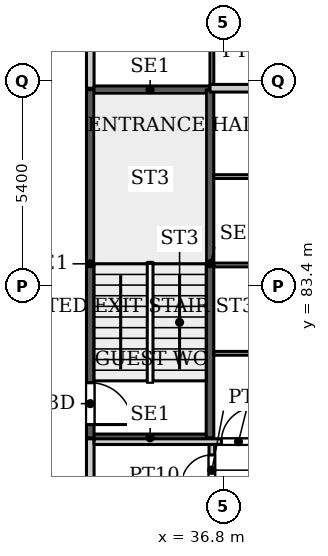
"""IFC4 building model, lengths in metres.
Left out: names, types, materials, properties, quantities, classifications, styles, units other than length and angle.
Written with IfcOpenShell. Run it as: python <this file> out.ifc"""

import sys

from ifc_helpers import new_model, si_unit, direction, frame, frame_2d, origin, place, context, subcontext, project, spatial, rectangle, extrude, source, transform, mapped, element, fill, save


model = new_model("IFC4")
c1 = context("Model", 3, precision=1e-05, world=origin(), true_north=direction((0.0, 1.0)))
c2 = subcontext(c1, "Body", "Model", "MODEL_VIEW")
j1 = project(units=[si_unit("LENGTHUNIT", "METRE"), si_unit("PLANEANGLEUNIT", "RADIAN")], contexts=[c1])
p1 = place(None, origin())
s1 = spatial("IfcSite", under=j1, at=p1, CompositionType="ELEMENT")
p2 = place(p1, origin())
s2 = spatial("IfcBuilding", under=s1, at=p2, CompositionType="ELEMENT")
p3 = place(p2, frame((0.0, 0.0, 53.9)))
s3 = spatial("IfcBuildingStorey", under=s2, at=p3, CompositionType="ELEMENT", Elevation=53.9)
for number, where, z_axis, x_axis in (
    (1, (33.3, 79.4, 0.0), (0.0, 0.0, 1.0), (1.0, 0.0, 0.0)),
    (2, (33.3, 88.56, 0.0), (0.0, 0.0, 1.0), (1.0, 0.0, 0.0)),
):
    element("IfcWall", number, at=place(p3, frame(where, z_axis=z_axis, x_axis=x_axis)), inside=s3, PredefinedType="SHEAR", context=c2, shape_type="SweptSolid", body=[
        extrude(rectangle(XDim=3.15, YDim=0.2, at=frame_2d((1.575, 0.0))), origin(), (0.0, 0.0, 1.0), 3.9),
    ])
p4 = place(p3, frame((33.3, 79.4, 0.0), z_axis=(0.0, 0.0, 1.0), x_axis=(0.0, 1.0, 0.0)))
e3 = element("IfcWall", 3, at=p4, inside=s3, PredefinedType="SHEAR", context=c2, shape_type="SweptSolid", body=[
    extrude(rectangle(XDim=9.16, YDim=0.2, at=frame_2d((4.58, 0.0))), origin(), (0.0, 0.0, 1.0), 3.9),
])
p5 = place(p4, frame((0.35, 0.0, 0.0)))
e4 = element("IfcOpeningElement", 4, at=p5, cuts=e3, PredefinedType="OPENING", context=c2, shape_type="SweptSolid", body=[
    extrude(rectangle(XDim=1.1, YDim=2.2, at=frame_2d((0.55, 1.1))), frame((0.0, 0.11, 0.0), z_axis=(0.0, -1.0, 0.0), x_axis=(1.0, 0.0, 0.0)), (0.0, 0.0, 1.0), 0.22),
])
p6 = place(p3, frame((36.45, 79.4, 0.0), z_axis=(0.0, 0.0, 1.0), x_axis=(0.0, 1.0, 0.0)))
e5 = element("IfcWall", 5, at=p6, inside=s3, PredefinedType="SHEAR", context=c2, shape_type="SweptSolid", body=[
    extrude(rectangle(XDim=9.16, YDim=0.2, at=frame_2d((4.58, 0.0))), origin(), (0.0, 0.0, 1.0), 3.9),
])
p7 = place(p3, frame((33.3, 54.4, 0.0), z_axis=(0.0, 0.0, 1.0), x_axis=(0.0, 1.0, 0.0)))
e6 = element("IfcWall", 6, at=p7, inside=s3, PredefinedType="PARTITIONING", context=c2, shape_type="SweptSolid", body=[
    extrude(rectangle(XDim=24.975, YDim=0.2, at=frame_2d((12.488, 0.0))), origin(), (0.0, 0.0, 1.0), 3.6),
])
p8 = place(p7, frame((10.6, 0.0, 0.0)))
e7 = element("IfcOpeningElement", 7, at=p8, cuts=e6, PredefinedType="OPENING", context=c2, shape_type="SweptSolid", body=[
    extrude(rectangle(XDim=1.0, YDim=2.1, at=frame_2d((0.5, 1.05))), frame((0.0, 0.11, 0.0), z_axis=(0.0, -1.0, 0.0), x_axis=(1.0, 0.0, 0.0)), (0.0, 0.0, 1.0), 0.22),
])
p9 = place(p7, frame((22.0, 0.0, 0.0)))
e8 = element("IfcOpeningElement", 8, at=p9, cuts=e6, PredefinedType="OPENING", context=c2, shape_type="SweptSolid", body=[
    extrude(rectangle(XDim=1.0, YDim=2.1, at=frame_2d((0.5, 1.05))), frame((0.0, 0.11, 0.0), z_axis=(0.0, -1.0, 0.0), x_axis=(1.0, 0.0, 0.0)), (0.0, 0.0, 1.0), 0.22),
])
p10 = place(p3, frame((33.3, 88.6, 0.0), z_axis=(0.0, 0.0, 1.0), x_axis=(0.0, 1.0, 0.0)))
e9 = element("IfcWall", 9, at=p10, inside=s3, PredefinedType="PARTITIONING", context=c2, shape_type="SweptSolid", body=[
    extrude(rectangle(XDim=5.175, YDim=0.2, at=frame_2d((2.587, 0.0))), origin(), (0.0, 0.0, 1.0), 3.6),
])
p11 = place(p10, frame((3.7, 0.0, 0.0)))
e10 = element("IfcOpeningElement", 10, at=p11, cuts=e9, PredefinedType="OPENING", context=c2, shape_type="SweptSolid", body=[
    extrude(rectangle(XDim=1.0, YDim=2.1, at=frame_2d((0.5, 1.05))), frame((0.0, 0.11, 0.0), z_axis=(0.0, -1.0, 0.0), x_axis=(1.0, 0.0, 0.0)), (0.0, 0.0, 1.0), 0.22),
])
p12 = place(p3, frame((33.4, 79.3, 0.0), z_axis=(0.0, 0.0, 1.0), x_axis=(1.0, 0.0, 0.0)))
e11 = element("IfcWall", 11, at=p12, inside=s3, PredefinedType="PARTITIONING", context=c2, shape_type="SweptSolid", body=[
    extrude(rectangle(XDim=12.5, YDim=0.15, at=frame_2d((6.25, 0.0))), origin(), (0.0, 0.0, 1.0), 3.6),
])
p13 = place(p12, frame((3.35, 0.0, 0.0)))
e12 = element("IfcOpeningElement", 12, at=p13, cuts=e11, PredefinedType="OPENING", context=c2, shape_type="SweptSolid", body=[
    extrude(rectangle(XDim=0.9, YDim=2.1, at=frame_2d((0.45, 1.05))), frame((0.0, 0.085, 0.0), z_axis=(0.0, -1.0, 0.0), x_axis=(1.0, 0.0, 0.0)), (0.0, 0.0, 1.0), 0.17),
])
p14 = place(p3, frame((36.45, 88.6, 0.0), z_axis=(0.0, 0.0, 1.0), x_axis=(1.0, 0.0, 0.0)))
e13 = element("IfcWall", 13, at=p14, inside=s3, PredefinedType="PARTITIONING", context=c2, shape_type="SweptSolid", body=[
    extrude(rectangle(XDim=9.45, YDim=0.2, at=frame_2d((4.725, 0.0))), origin(), (0.0, 0.0, 1.0), 3.147),
])
p15 = place(p3, frame((36.5, 77.875, 0.0), z_axis=(0.0, 0.0, 1.0), x_axis=(0.0, 1.0, 0.0)))
e14 = element("IfcWall", 14, at=p15, inside=s3, PredefinedType="PARTITIONING", context=c2, shape_type="SweptSolid", body=[
    extrude(rectangle(XDim=1.35, YDim=0.15, at=frame_2d((0.675, 0.0))), origin(), (0.0, 0.0, 1.0), 3.6),
])
p16 = place(p15, frame((0.275, 0.0, 0.0)))
e15 = element("IfcOpeningElement", 15, at=p16, cuts=e14, PredefinedType="OPENING", context=c2, shape_type="SweptSolid", body=[
    extrude(rectangle(XDim=0.8, YDim=2.1, at=frame_2d((0.4, 1.05))), frame((0.0, 0.085, 0.0), z_axis=(0.0, -1.0, 0.0), x_axis=(1.0, 0.0, 0.0)), (0.0, 0.0, 1.0), 0.17),
])
p17 = place(p3, frame((36.5, 88.7, 0.0), z_axis=(0.0, 0.0, 1.0), x_axis=(0.0, 1.0, 0.0)))
e16 = element("IfcWall", 16, at=p17, inside=s3, PredefinedType="PARTITIONING", context=c2, shape_type="SweptSolid", body=[
    extrude(rectangle(XDim=3.25, YDim=0.1, at=frame_2d((1.625, 0.0))), origin(), (0.0, 0.0, 1.0), 3.6),
])
p18 = place(p17, frame((1.1, 0.0, 0.0)))
e17 = element("IfcOpeningElement", 17, at=p18, cuts=e16, PredefinedType="OPENING", context=c2, shape_type="SweptSolid", body=[
    extrude(rectangle(XDim=0.9, YDim=2.1, at=frame_2d((0.45, 1.05))), frame((0.0, 0.06, 0.0), z_axis=(0.0, -1.0, 0.0), x_axis=(1.0, 0.0, 0.0)), (0.0, 0.0, 1.0), 0.12),
])
p19 = place(p3, frame((36.549, 81.625, 0.0), z_axis=(0.0, 0.0, 1.0), x_axis=(1.0, 0.0, 0.0)))
e18 = element("IfcWall", 18, at=p19, inside=s3, PredefinedType="PARTITIONING", context=c2, shape_type="SweptSolid", body=[
    extrude(rectangle(XDim=9.351, YDim=0.1, at=frame_2d((4.675, 0.0))), origin(), (0.0, 0.0, 1.0), 3.6),
])
p20 = place(p19, frame((4.176, 0.0, 0.0)))
e19 = element("IfcOpeningElement", 19, at=p20, cuts=e18, PredefinedType="OPENING", context=c2, shape_type="SweptSolid", body=[
    extrude(rectangle(XDim=0.9, YDim=2.1, at=frame_2d((0.45, 1.05))), frame((0.0, 0.06, 0.0), z_axis=(0.0, -1.0, 0.0), x_axis=(1.0, 0.0, 0.0)), (0.0, 0.0, 1.0), 0.12),
])
p21 = place(p3, frame((36.549, 83.95, 0.0), z_axis=(0.0, 0.0, 1.0), x_axis=(1.0, 0.0, 0.0)))
e20 = element("IfcWall", 20, at=p21, inside=s3, PredefinedType="PARTITIONING", context=c2, shape_type="SweptSolid", body=[
    extrude(rectangle(XDim=9.351, YDim=0.1, at=frame_2d((4.675, 0.0))), origin(), (0.0, 0.0, 1.0), 3.6),
])
p22 = place(p21, frame((4.176, 0.0, 0.0)))
e21 = element("IfcOpeningElement", 21, at=p22, cuts=e20, PredefinedType="OPENING", context=c2, shape_type="SweptSolid", body=[
    extrude(rectangle(XDim=0.9, YDim=2.1, at=frame_2d((0.45, 1.05))), frame((0.0, 0.06, 0.0), z_axis=(0.0, -1.0, 0.0), x_axis=(1.0, 0.0, 0.0)), (0.0, 0.0, 1.0), 0.12),
])
p23 = place(p3, frame((36.549, 86.275, 0.0), z_axis=(0.0, 0.0, 1.0), x_axis=(1.0, 0.0, 0.0)))
e22 = element("IfcWall", 22, at=p23, inside=s3, PredefinedType="PARTITIONING", context=c2, shape_type="SweptSolid", body=[
    extrude(rectangle(XDim=9.351, YDim=0.1, at=frame_2d((4.675, 0.0))), origin(), (0.0, 0.0, 1.0), 3.6),
])
p24 = place(p23, frame((4.176, 0.0, 0.0)))
e23 = element("IfcOpeningElement", 23, at=p24, cuts=e22, PredefinedType="OPENING", context=c2, shape_type="SweptSolid", body=[
    extrude(rectangle(XDim=0.9, YDim=2.1, at=frame_2d((0.45, 1.05))), frame((0.0, 0.06, 0.0), z_axis=(0.0, -1.0, 0.0), x_axis=(1.0, 0.0, 0.0)), (0.0, 0.0, 1.0), 0.12),
])
m1 = source(origin(), c2, "Body", "SweptSolid", [
    extrude(rectangle(XDim=1.1, YDim=2.2, at=frame_2d((0.55, 1.1))), frame((0.0, 0.025, 0.0), z_axis=(0.0, -1.0, 0.0), x_axis=(1.0, 0.0, 0.0)), (0.0, 0.0, 1.0), 0.05),
])
p25 = place(p5, origin())
e24 = element("IfcDoor", 24, at=p25, inside=s3, OperationType="SINGLE_SWING_RIGHT", PredefinedType="DOOR", context=c2, shape_type="MappedRepresentation", body=[
    mapped(m1, transform((0.0, 0.0, 0.0), x_axis=(1.0, 0.0, 0.0), y_axis=(0.0, 1.0, 0.0), z_axis=(0.0, 0.0, 1.0), scale=1.0)),
])
fill(e4, e24)
m2 = source(origin(), c2, "Body", "SweptSolid", [
    extrude(rectangle(XDim=0.8, YDim=2.1, at=frame_2d((0.4, 1.05))), frame((0.0, 0.025, 0.0), z_axis=(0.0, -1.0, 0.0), x_axis=(1.0, 0.0, 0.0)), (0.0, 0.0, 1.0), 0.05),
])
p26 = place(p16, origin())
e25 = element("IfcDoor", 25, at=p26, inside=s3, OperationType="SINGLE_SWING_LEFT", PredefinedType="DOOR", context=c2, shape_type="MappedRepresentation", body=[
    mapped(m2, transform((0.0, 0.0, 0.0), x_axis=(1.0, 0.0, 0.0), y_axis=(0.0, 1.0, 0.0), z_axis=(0.0, 0.0, 1.0), scale=1.0)),
])
fill(e15, e25)
m3 = source(origin(), c2, "Body", "SweptSolid", [
    extrude(rectangle(XDim=0.9, YDim=2.1, at=frame_2d((0.45, 1.05))), frame((0.0, 0.025, 0.0), z_axis=(0.0, -1.0, 0.0), x_axis=(1.0, 0.0, 0.0)), (0.0, 0.0, 1.0), 0.05),
])
p27 = place(p13, origin())
e26 = element("IfcDoor", 26, at=p27, inside=s3, OperationType="SINGLE_SWING_LEFT", PredefinedType="DOOR", context=c2, shape_type="MappedRepresentation", body=[
    mapped(m3, transform((0.0, 0.0, 0.0), x_axis=(1.0, 0.0, 0.0), y_axis=(0.0, 1.0, 0.0), z_axis=(0.0, 0.0, 1.0), scale=1.0)),
])
fill(e12, e26)
save(model, sys.argv[1])
